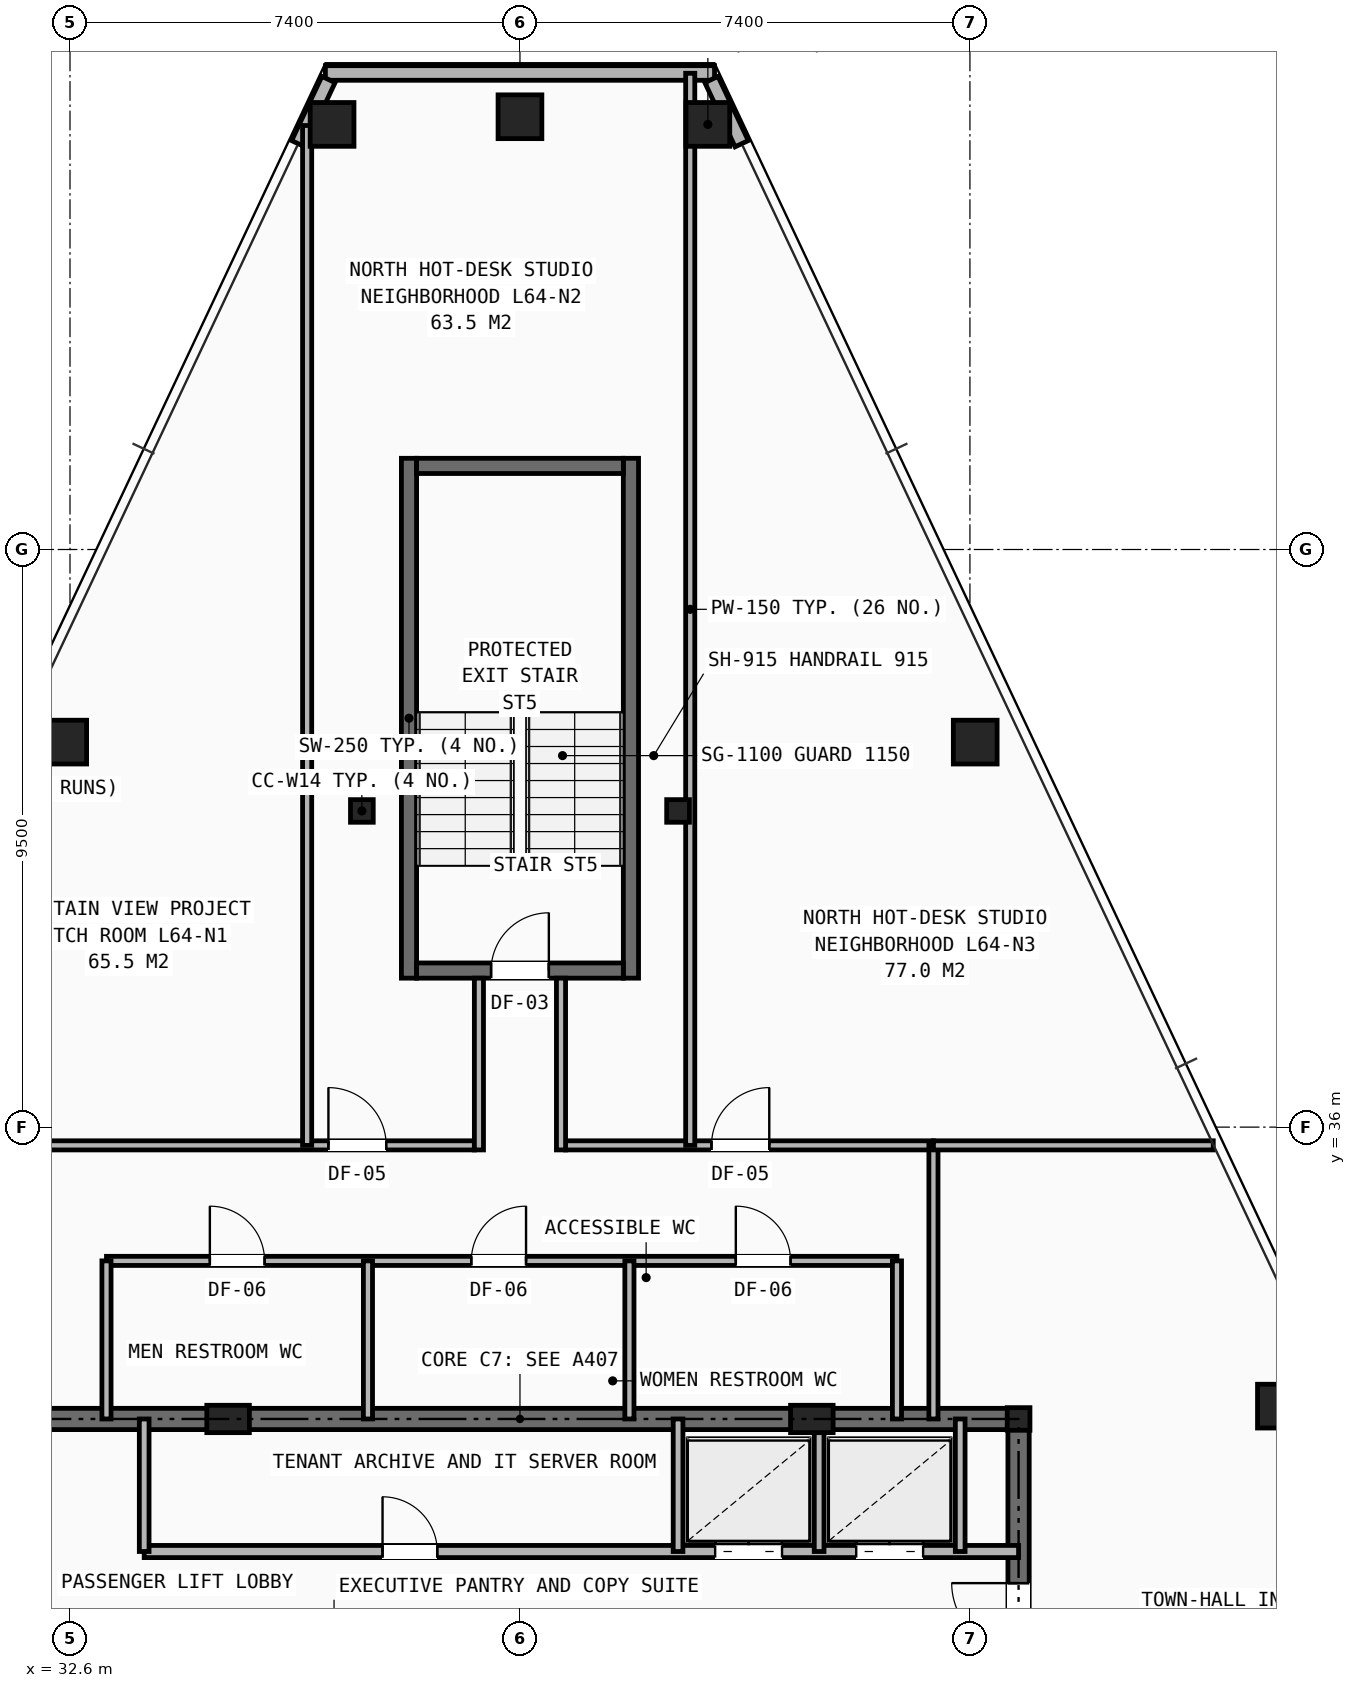
"""IFC4 building model, lengths in metres.
Left out: names, types, materials, properties, quantities, classifications, styles, units other than length and angle.
Written with IfcOpenShell. Run it as: python <this file> out.ifc"""

import sys

from ifc_helpers import new_model, si_unit, direction, frame, frame_2d, origin, origin_2d, place, context, subcontext, project, spatial, rectangle, hollow_rectangle, i_section, extrude, element, fill, save


model = new_model("IFC4")
c1 = context("Model", 3, precision=1e-05, world=origin(), true_north=direction((0.0, 1.0)))
c2 = subcontext(c1, "Body", "Model", "MODEL_VIEW")
j1 = project(units=[si_unit("LENGTHUNIT", "METRE"), si_unit("PLANEANGLEUNIT", "RADIAN")], contexts=[c1])
p1 = place(None, origin())
s1 = spatial("IfcSite", under=j1, at=p1, CompositionType="ELEMENT")
p2 = place(p1, origin())
s2 = spatial("IfcBuilding", under=s1, at=p2, CompositionType="ELEMENT")
p3 = place(p2, frame((0.0, 0.0, 225.9)))
s3 = spatial("IfcBuildingStorey", under=s2, at=p3, CompositionType="ELEMENT", Elevation=225.9)
for number, where, z_axis, x_axis in (
    (1, (48.2, 31.2, 0.0), (0.0, 0.0, 1.0), (1.0, 0.0, 0.0)),
    (2, (37.4, 41.2, 0.0), (0.0, 0.0, 1.0), (1.0, 0.0, 0.0)),
    (3, (42.6, 41.2, 0.0), (0.0, 0.0, 1.0), (1.0, 0.0, 0.0)),
):
    element("IfcColumn", number, at=place(p3, frame(where, z_axis=z_axis, x_axis=x_axis)), inside=s3, PredefinedType="COLUMN", context=c2, shape_type="SweptSolid", body=[
        extrude(i_section(OverallWidth=0.374, OverallDepth=0.372, WebThickness=0.016, FlangeThickness=0.026, at=origin_2d()), origin(), (0.0, 0.0, 1.0), 3.5),
    ])
for number, where, z_axis, x_axis in (
    (4, (35.2, 31.2, 0.0), (0.0, 0.0, 1.0), (1.0, 0.0, 0.0)),
    (5, (44.8, 31.2, 0.0), (0.0, 0.0, 1.0), (1.0, 0.0, 0.0)),
):
    element("IfcColumn", number, at=place(p3, frame(where, z_axis=z_axis, x_axis=x_axis)), inside=s3, PredefinedType="PILASTER", context=c2, shape_type="SweptSolid", body=[
        extrude(rectangle(XDim=0.7, YDim=0.45, at=origin_2d()), origin(), (0.0, 0.0, 1.0), 3.5),
    ])
for number, where, z_axis, x_axis in (
    (6, (43.09, 52.491, 0.0), (0.0, 0.0, 1.0), (1.0, 0.0, 0.0)),
    (7, (40.0, 52.617, 0.0), (0.0, 0.0, 1.0), (1.0, 0.0, 0.0)),
    (8, (36.91, 52.491, 0.0), (0.0, 0.0, 1.0), (1.0, 0.0, 0.0)),
    (9, (32.513, 42.332, 0.0), (0.0, 0.0, 1.0), (1.0, 0.0, 0.0)),
    (10, (52.49, 31.411, 0.0), (0.0, 0.0, 1.0), (1.0, 0.0, 0.0)),
    (11, (47.487, 42.332, 0.0), (0.0, 0.0, 1.0), (1.0, 0.0, 0.0)),
):
    element("IfcColumn", number, at=place(p3, frame(where, z_axis=z_axis, x_axis=x_axis)), inside=s3, PredefinedType="COLUMN", context=c2, shape_type="SweptSolid", body=[
        extrude(hollow_rectangle(XDim=0.72, YDim=0.72, WallThickness=0.05, at=origin_2d()), origin(), (0.0, 0.0, 1.0), 3.5),
    ])
p4 = place(p3, frame((36.8, 53.337, 0.0), z_axis=(0.0, 0.0, 1.0), x_axis=(1.0, 0.0, 0.0)))
e12 = element("IfcWall", 12, at=p4, inside=s3, PredefinedType="SHEAR", context=c2, shape_type="SweptSolid", body=[
    extrude(rectangle(XDim=6.4, YDim=0.24, at=frame_2d((3.2, 0.0))), origin(), (0.0, 0.0, 1.0), 2.623),
])
for number, where, z_axis, x_axis in (
    (13, (36.851, 53.23, 0.0), (0.0, 0.0, 1.0), (-0.426, -0.905, 0.0)),
    (14, (43.646, 52.174, 0.0), (0.0, 0.0, 1.0), (-0.426, 0.905, 0.0)),
):
    element("IfcWall", number, at=place(p3, frame(where, z_axis=z_axis, x_axis=x_axis)), inside=s3, PredefinedType="SHEAR", context=c2, shape_type="SweptSolid", body=[
        extrude(rectangle(XDim=1.167, YDim=0.24, at=frame_2d((0.584, 0.0))), origin(), (0.0, 0.0, 1.0), 2.623),
    ])
p5 = place(p3, frame((31.8, 31.2, 0.0), z_axis=(0.0, 0.0, 1.0), x_axis=(1.0, 0.0, 0.0)))
e15 = element("IfcWall", 15, at=p5, inside=s3, PredefinedType="SHEAR", context=c2, shape_type="SweptSolid", body=[
    extrude(rectangle(XDim=16.4, YDim=0.35, at=frame_2d((8.2, 0.0))), origin(), (0.0, 0.0, 1.0), 3.25),
])
p6 = place(p3, frame((48.2, 16.4, 0.0), z_axis=(0.0, 0.0, 1.0), x_axis=(0.0, 1.0, 0.0)))
e16 = element("IfcWall", 16, at=p6, inside=s3, PredefinedType="SHEAR", context=c2, shape_type="SweptSolid", body=[
    extrude(rectangle(XDim=14.8, YDim=0.35, at=frame_2d((7.4, 0.0))), origin(), (0.0, 0.0, 1.0), 3.25),
])
p7 = place(p6, frame((11.0, 0.0, 0.0)))
e17 = element("IfcOpeningElement", 17, at=p7, cuts=e16, PredefinedType="OPENING", context=c2, shape_type="SweptSolid", body=[
    extrude(rectangle(XDim=1.1, YDim=2.15, at=frame_2d((0.55, 1.075))), frame((0.0, 0.185, 0.0), z_axis=(0.0, -1.0, 0.0), x_axis=(1.0, 0.0, 0.0)), (0.0, 0.0, 1.0), 0.37),
])
p8 = place(p3, frame((33.82, 29.02, 0.0), z_axis=(0.0, 0.0, 1.0), x_axis=(1.0, 0.0, 0.0)))
e18 = element("IfcWall", 18, at=p8, inside=s3, PredefinedType="SOLIDWALL", context=c2, shape_type="SweptSolid", body=[
    extrude(rectangle(XDim=14.38, YDim=0.2, at=frame_2d((7.19, 0.0))), origin(), (0.0, 0.0, 1.0), 2.705),
])
p9 = place(p8, frame((3.92, 0.0, 0.0)))
e19 = element("IfcOpeningElement", 19, at=p9, cuts=e18, PredefinedType="OPENING", context=c2, shape_type="SweptSolid", body=[
    extrude(rectangle(XDim=0.9, YDim=2.1, at=frame_2d((0.45, 1.05))), frame((0.0, 0.11, 0.0), z_axis=(0.0, -1.0, 0.0), x_axis=(1.0, 0.0, 0.0)), (0.0, 0.0, 1.0), 0.22),
])
p10 = place(p8, frame((9.39, 0.0, 0.0)))
e20 = element("IfcOpeningElement", 20, at=p10, cuts=e18, PredefinedType="OPENING", context=c2, shape_type="SweptSolid", body=[
    extrude(rectangle(XDim=1.1, YDim=2.15, at=frame_2d((0.55, 1.075))), frame((0.0, 0.11, 0.0), z_axis=(0.0, -1.0, 0.0), x_axis=(1.0, 0.0, 0.0)), (0.0, 0.0, 1.0), 0.22),
])
p11 = place(p8, frame((11.71, 0.0, 0.0)))
e21 = element("IfcOpeningElement", 21, at=p11, cuts=e18, PredefinedType="OPENING", context=c2, shape_type="SweptSolid", body=[
    extrude(rectangle(XDim=1.1, YDim=2.15, at=frame_2d((0.55, 1.075))), frame((0.0, 0.11, 0.0), z_axis=(0.0, -1.0, 0.0), x_axis=(1.0, 0.0, 0.0)), (0.0, 0.0, 1.0), 0.22),
])
for number, where, z_axis, x_axis in (
    (22, (33.82, 29.02, 0.0), (0.0, 0.0, 1.0), (0.0, 1.0, 0.0)),
    (23, (42.6, 29.02, 0.0), (0.0, 0.0, 1.0), (0.0, 1.0, 0.0)),
    (24, (44.92, 29.02, 0.0), (0.0, 0.0, 1.0), (0.0, 1.0, 0.0)),
    (25, (47.24, 29.02, 0.0), (0.0, 0.0, 1.0), (0.0, 1.0, 0.0)),
):
    element("IfcWall", number, at=place(p3, frame(where, z_axis=z_axis, x_axis=x_axis)), inside=s3, PredefinedType="SOLIDWALL", context=c2, shape_type="SweptSolid", body=[
        extrude(rectangle(XDim=2.18, YDim=0.16, at=frame_2d((1.09, 0.0))), origin(), (0.0, 0.0, 1.0), 2.705),
    ])
p12 = place(p3, frame((33.2, 33.8, 0.0), z_axis=(0.0, 0.0, 1.0), x_axis=(1.0, 0.0, 0.0)))
e26 = element("IfcWall", 26, at=p12, inside=s3, PredefinedType="PARTITIONING", context=c2, shape_type="SweptSolid", body=[
    extrude(rectangle(XDim=13.0, YDim=0.15, at=frame_2d((6.5, 0.0))), origin(), (0.0, 0.0, 1.0), 3.25),
])
p13 = place(p12, frame((1.7, 0.0, 0.0)))
e27 = element("IfcOpeningElement", 27, at=p13, cuts=e26, PredefinedType="OPENING", context=c2, shape_type="SweptSolid", body=[
    extrude(rectangle(XDim=0.9, YDim=2.1, at=frame_2d((0.45, 1.05))), frame((0.0, 0.085, 0.0), z_axis=(0.0, -1.0, 0.0), x_axis=(1.0, 0.0, 0.0)), (0.0, 0.0, 1.0), 0.17),
])
p14 = place(p12, frame((6.0, 0.0, 0.0)))
e28 = element("IfcOpeningElement", 28, at=p14, cuts=e26, PredefinedType="OPENING", context=c2, shape_type="SweptSolid", body=[
    extrude(rectangle(XDim=0.9, YDim=2.1, at=frame_2d((0.45, 1.05))), frame((0.0, 0.085, 0.0), z_axis=(0.0, -1.0, 0.0), x_axis=(1.0, 0.0, 0.0)), (0.0, 0.0, 1.0), 0.17),
])
p15 = place(p12, frame((10.35, 0.0, 0.0)))
e29 = element("IfcOpeningElement", 29, at=p15, cuts=e26, PredefinedType="OPENING", context=c2, shape_type="SweptSolid", body=[
    extrude(rectangle(XDim=0.9, YDim=2.1, at=frame_2d((0.45, 1.05))), frame((0.0, 0.085, 0.0), z_axis=(0.0, -1.0, 0.0), x_axis=(1.0, 0.0, 0.0)), (0.0, 0.0, 1.0), 0.17),
])
for number, where, z_axis, x_axis in (
    (30, (33.2, 31.2, 0.0), (0.0, 0.0, 1.0), (0.0, 1.0, 0.0)),
    (31, (46.2, 31.2, 0.0), (0.0, 0.0, 1.0), (0.0, 1.0, 0.0)),
    (32, (37.5, 31.2, 0.0), (0.0, 0.0, 1.0), (0.0, 1.0, 0.0)),
    (33, (41.8, 31.2, 0.0), (0.0, 0.0, 1.0), (0.0, 1.0, 0.0)),
):
    element("IfcWall", number, at=place(p3, frame(where, z_axis=z_axis, x_axis=x_axis)), inside=s3, PredefinedType="PARTITIONING", context=c2, shape_type="SweptSolid", body=[
        extrude(rectangle(XDim=2.6, YDim=0.15, at=frame_2d((1.3, 0.0))), origin(), (0.0, 0.0, 1.0), 2.705),
    ])
p16 = place(p3, frame((29.8, 35.7, 0.0), z_axis=(0.0, 0.0, 1.0), x_axis=(1.0, 0.0, 0.0)))
e34 = element("IfcWall", 34, at=p16, inside=s3, PredefinedType="PARTITIONING", context=c2, shape_type="SweptSolid", body=[
    extrude(rectangle(XDim=9.45, YDim=0.15, at=frame_2d((4.725, 0.0))), origin(), (0.0, 0.0, 1.0), 2.628),
])
p17 = place(p16, frame((0.55, 0.0, 0.0)))
e35 = element("IfcOpeningElement", 35, at=p17, cuts=e34, PredefinedType="OPENING", context=c2, shape_type="SweptSolid", body=[
    extrude(rectangle(XDim=0.95, YDim=2.1, at=frame_2d((0.475, 1.05))), frame((0.0, 0.085, 0.0), z_axis=(0.0, -1.0, 0.0), x_axis=(1.0, 0.0, 0.0)), (0.0, 0.0, 1.0), 0.17),
])
p18 = place(p16, frame((7.05, 0.0, 0.0)))
e36 = element("IfcOpeningElement", 36, at=p18, cuts=e34, PredefinedType="OPENING", context=c2, shape_type="SweptSolid", body=[
    extrude(rectangle(XDim=0.95, YDim=2.1, at=frame_2d((0.475, 1.05))), frame((0.0, 0.085, 0.0), z_axis=(0.0, -1.0, 0.0), x_axis=(1.0, 0.0, 0.0)), (0.0, 0.0, 1.0), 0.17),
])
p19 = place(p3, frame((40.75, 35.7, 0.0), z_axis=(0.0, 0.0, 1.0), x_axis=(1.0, 0.0, 0.0)))
e37 = element("IfcWall", 37, at=p19, inside=s3, PredefinedType="PARTITIONING", context=c2, shape_type="SweptSolid", body=[
    extrude(rectangle(XDim=6.05, YDim=0.15, at=frame_2d((3.025, 0.0))), origin(), (0.0, 0.0, 1.0), 3.25),
])
p20 = place(p19, frame((2.4, 0.0, 0.0)))
e38 = element("IfcOpeningElement", 38, at=p20, cuts=e37, PredefinedType="OPENING", context=c2, shape_type="SweptSolid", body=[
    extrude(rectangle(XDim=0.95, YDim=2.1, at=frame_2d((0.475, 1.05))), frame((0.0, 0.085, 0.0), z_axis=(0.0, -1.0, 0.0), x_axis=(1.0, 0.0, 0.0)), (0.0, 0.0, 1.0), 0.17),
])
p21 = place(p3, frame((46.8, 31.2, 0.0), z_axis=(0.0, 0.0, 1.0), x_axis=(0.0, 1.0, 0.0)))
e39 = element("IfcWall", 39, at=p21, inside=s3, PredefinedType="PARTITIONING", context=c2, shape_type="SweptSolid", body=[
    extrude(rectangle(XDim=4.5, YDim=0.15, at=frame_2d((2.25, 0.0))), origin(), (0.0, 0.0, 1.0), 2.705),
])
p22 = place(p3, frame((46.8, 35.7, 0.0), z_axis=(0.0, 0.0, 1.0), x_axis=(1.0, 0.0, 0.0)))
e40 = element("IfcWall", 40, at=p22, inside=s3, PredefinedType="PARTITIONING", context=c2, shape_type="SweptSolid", body=[
    extrude(rectangle(XDim=4.602, YDim=0.15, at=frame_2d((2.301, 0.0))), origin(), (0.0, 0.0, 1.0), 2.628),
])
p23 = place(p3, frame((36.5, 35.7, 0.0), z_axis=(0.0, 0.0, 1.0), x_axis=(0.0, 1.0, 0.0)))
e41 = element("IfcWall", 41, at=p23, inside=s3, PredefinedType="PARTITIONING", context=c2, shape_type="SweptSolid", body=[
    extrude(rectangle(XDim=16.773, YDim=0.15, at=frame_2d((8.387, 0.0))), origin(), (0.0, 0.0, 1.0), 2.292),
])
p24 = place(p3, frame((42.8, 35.7, 0.0), z_axis=(0.0, 0.0, 1.0), x_axis=(0.0, 1.0, 0.0)))
e42 = element("IfcWall", 42, at=p24, inside=s3, PredefinedType="PARTITIONING", context=c2, shape_type="SweptSolid", body=[
    extrude(rectangle(XDim=17.633, YDim=0.15, at=frame_2d((8.816, 0.0))), origin(), (0.0, 0.0, 1.0), 2.292),
])
for number, where, z_axis, x_axis in (
    (43, (38.175, 38.45, 0.0), (0.0, 0.0, 1.0), (0.0, 1.0, 0.0)),
    (44, (41.825, 38.45, 0.0), (0.0, 0.0, 1.0), (0.0, 1.0, 0.0)),
):
    element("IfcWall", number, at=place(p3, frame(where, z_axis=z_axis, x_axis=x_axis)), inside=s3, PredefinedType="SHEAR", context=c2, shape_type="SweptSolid", body=[
        extrude(rectangle(XDim=8.55, YDim=0.25, at=frame_2d((4.275, 0.0))), origin(), (0.0, 0.0, 1.0), 3.25),
    ])
p25 = place(p3, frame((38.3, 38.575, 0.0), z_axis=(0.0, 0.0, 1.0), x_axis=(1.0, 0.0, 0.0)))
e45 = element("IfcWall", 45, at=p25, inside=s3, PredefinedType="SHEAR", context=c2, shape_type="SweptSolid", body=[
    extrude(rectangle(XDim=3.4, YDim=0.25, at=frame_2d((1.7, 0.0))), origin(), (0.0, 0.0, 1.0), 3.25),
])
p26 = place(p25, frame((1.225, 0.0, 0.0)))
e46 = element("IfcOpeningElement", 46, at=p26, cuts=e45, PredefinedType="OPENING", context=c2, shape_type="SweptSolid", body=[
    extrude(rectangle(XDim=0.95, YDim=2.1, at=frame_2d((0.475, 1.05))), frame((0.0, 0.135, 0.0), z_axis=(0.0, -1.0, 0.0), x_axis=(1.0, 0.0, 0.0)), (0.0, 0.0, 1.0), 0.27),
])
p27 = place(p3, frame((38.3, 46.875, 0.0), z_axis=(0.0, 0.0, 1.0), x_axis=(1.0, 0.0, 0.0)))
e47 = element("IfcWall", 47, at=p27, inside=s3, PredefinedType="SHEAR", context=c2, shape_type="SweptSolid", body=[
    extrude(rectangle(XDim=3.4, YDim=0.25, at=frame_2d((1.7, 0.0))), origin(), (0.0, 0.0, 1.0), 3.25),
])
for number, where, z_axis, x_axis in (
    (48, (39.325, 35.625, 0.0), (0.0, 0.0, 1.0), (0.0, 1.0, 0.0)),
    (49, (40.675, 35.625, 0.0), (0.0, 0.0, 1.0), (0.0, 1.0, 0.0)),
):
    element("IfcWall", number, at=place(p3, frame(where, z_axis=z_axis, x_axis=x_axis)), inside=s3, PredefinedType="PARTITIONING", context=c2, shape_type="SweptSolid", body=[
        extrude(rectangle(XDim=2.825, YDim=0.15, at=frame_2d((1.413, 0.0))), origin(), (0.0, 0.0, 1.0), 3.25),
    ])
p28 = place(p7, origin())
e50 = element("IfcDoor", 50, at=p28, inside=s3, OperationType="SINGLE_SWING_RIGHT", PredefinedType="DOOR", context=c2, shape_type="SweptSolid", body=[
    extrude(rectangle(XDim=1.1, YDim=2.15, at=frame_2d((0.55, 1.075))), frame((0.0, 0.025, 0.0), z_axis=(0.0, -1.0, 0.0), x_axis=(1.0, 0.0, 0.0)), (0.0, 0.0, 1.0), 0.05),
])
fill(e17, e50)
p29 = place(p9, origin())
e51 = element("IfcDoor", 51, at=p29, inside=s3, OperationType="SINGLE_SWING_LEFT", PredefinedType="DOOR", context=c2, shape_type="SweptSolid", body=[
    extrude(rectangle(XDim=0.9, YDim=2.1, at=frame_2d((0.45, 1.05))), frame((0.0, 0.025, 0.0), z_axis=(0.0, -1.0, 0.0), x_axis=(1.0, 0.0, 0.0)), (0.0, 0.0, 1.0), 0.05),
])
fill(e19, e51)
p30 = place(p10, origin())
e52 = element("IfcDoor", 52, at=p30, inside=s3, OperationType="DOUBLE_DOOR_SLIDING", PredefinedType="DOOR", context=c2, shape_type="SweptSolid", body=[
    extrude(rectangle(XDim=1.1, YDim=2.15, at=frame_2d((0.55, 1.075))), frame((0.0, 0.025, 0.0), z_axis=(0.0, -1.0, 0.0), x_axis=(1.0, 0.0, 0.0)), (0.0, 0.0, 1.0), 0.05),
])
fill(e20, e52)
p31 = place(p11, origin())
e53 = element("IfcDoor", 53, at=p31, inside=s3, OperationType="DOUBLE_DOOR_SLIDING", PredefinedType="DOOR", context=c2, shape_type="SweptSolid", body=[
    extrude(rectangle(XDim=1.1, YDim=2.15, at=frame_2d((0.55, 1.075))), frame((0.0, 0.025, 0.0), z_axis=(0.0, -1.0, 0.0), x_axis=(1.0, 0.0, 0.0)), (0.0, 0.0, 1.0), 0.05),
])
fill(e21, e53)
p32 = place(p13, origin())
e54 = element("IfcDoor", 54, at=p32, inside=s3, OperationType="SINGLE_SWING_LEFT", PredefinedType="DOOR", context=c2, shape_type="SweptSolid", body=[
    extrude(rectangle(XDim=0.9, YDim=2.1, at=frame_2d((0.45, 1.05))), frame((0.0, 0.025, 0.0), z_axis=(0.0, -1.0, 0.0), x_axis=(1.0, 0.0, 0.0)), (0.0, 0.0, 1.0), 0.05),
])
fill(e27, e54)
p33 = place(p14, origin())
e55 = element("IfcDoor", 55, at=p33, inside=s3, OperationType="SINGLE_SWING_RIGHT", PredefinedType="DOOR", context=c2, shape_type="SweptSolid", body=[
    extrude(rectangle(XDim=0.9, YDim=2.1, at=frame_2d((0.45, 1.05))), frame((0.0, 0.025, 0.0), z_axis=(0.0, -1.0, 0.0), x_axis=(1.0, 0.0, 0.0)), (0.0, 0.0, 1.0), 0.05),
])
fill(e28, e55)
p34 = place(p15, origin())
e56 = element("IfcDoor", 56, at=p34, inside=s3, OperationType="SINGLE_SWING_LEFT", PredefinedType="DOOR", context=c2, shape_type="SweptSolid", body=[
    extrude(rectangle(XDim=0.9, YDim=2.1, at=frame_2d((0.45, 1.05))), frame((0.0, 0.025, 0.0), z_axis=(0.0, -1.0, 0.0), x_axis=(1.0, 0.0, 0.0)), (0.0, 0.0, 1.0), 0.05),
])
fill(e29, e56)
p35 = place(p18, origin())
e57 = element("IfcDoor", 57, at=p35, inside=s3, OperationType="SINGLE_SWING_LEFT", PredefinedType="DOOR", context=c2, shape_type="SweptSolid", body=[
    extrude(rectangle(XDim=0.95, YDim=2.1, at=frame_2d((0.475, 1.05))), frame((0.0, 0.025, 0.0), z_axis=(0.0, -1.0, 0.0), x_axis=(1.0, 0.0, 0.0)), (0.0, 0.0, 1.0), 0.05),
])
fill(e36, e57)
p36 = place(p20, origin())
e58 = element("IfcDoor", 58, at=p36, inside=s3, OperationType="SINGLE_SWING_RIGHT", PredefinedType="DOOR", context=c2, shape_type="SweptSolid", body=[
    extrude(rectangle(XDim=0.95, YDim=2.1, at=frame_2d((0.475, 1.05))), frame((0.0, 0.025, 0.0), z_axis=(0.0, -1.0, 0.0), x_axis=(1.0, 0.0, 0.0)), (0.0, 0.0, 1.0), 0.05),
])
fill(e38, e58)
p37 = place(p26, origin())
e59 = element("IfcDoor", 59, at=p37, inside=s3, OperationType="SINGLE_SWING_RIGHT", PredefinedType="DOOR", context=c2, shape_type="SweptSolid", body=[
    extrude(rectangle(XDim=0.95, YDim=2.1, at=frame_2d((0.475, 1.05))), frame((0.0, 0.025, 0.0), z_axis=(0.0, -1.0, 0.0), x_axis=(1.0, 0.0, 0.0)), (0.0, 0.0, 1.0), 0.05),
])
fill(e46, e59)
save(model, sys.argv[1])
